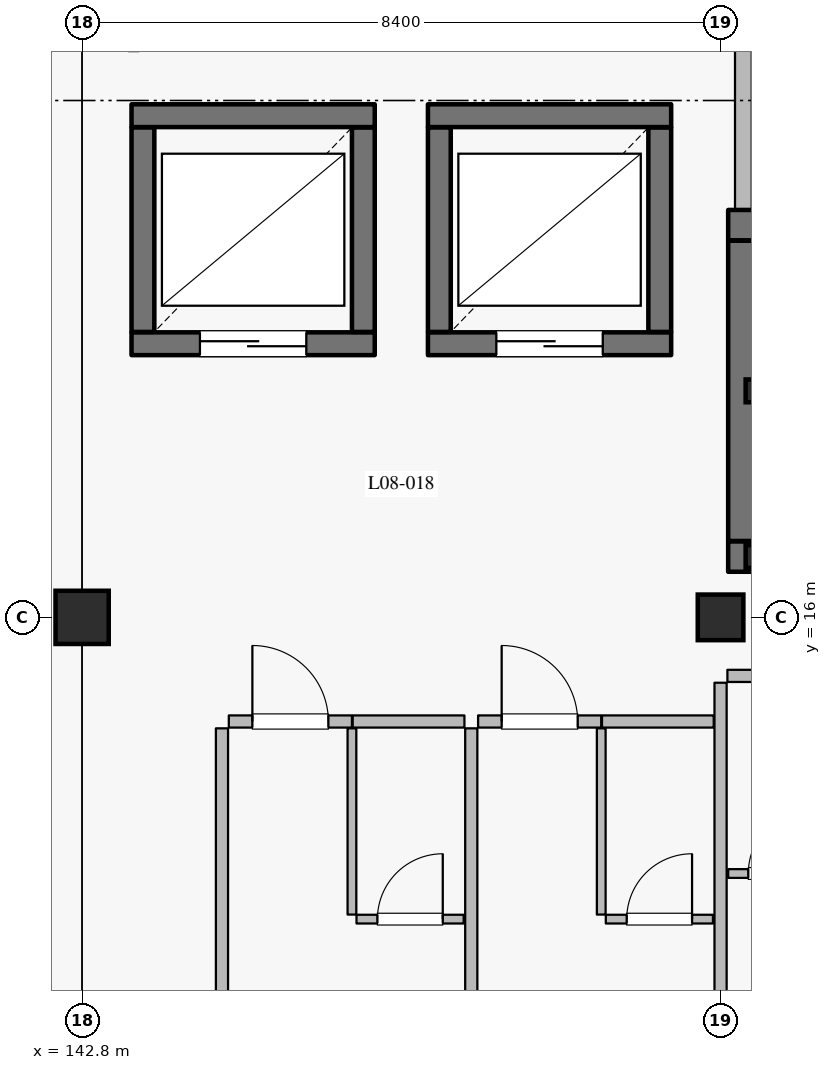
"""IFC4 building model, lengths in metres.
Left out: names, types, materials, properties, quantities, classifications, styles, units other than length and angle.
Written with IfcOpenShell. Run it as: python <this file> out.ifc"""

import sys

from ifc_helpers import new_model, si_unit, direction, frame, frame_2d, origin, origin_2d, place, context, subcontext, project, spatial, rectangle, hollow_rectangle, extrude, element, fill, save


model = new_model("IFC4")
c1 = context("Model", 3, precision=1e-05, world=origin(), true_north=direction((0.0, 1.0)))
c2 = subcontext(c1, "Body", "Model", "MODEL_VIEW")
j1 = project(units=[si_unit("LENGTHUNIT", "METRE"), si_unit("PLANEANGLEUNIT", "RADIAN")], contexts=[c1])
p1 = place(None, origin())
s1 = spatial("IfcSite", under=j1, at=p1, CompositionType="ELEMENT")
p2 = place(p1, origin())
s2 = spatial("IfcBuilding", under=s1, at=p2, CompositionType="ELEMENT")
p3 = place(p2, frame((0.0, 0.0, 36.0)))
s3 = spatial("IfcBuildingStorey", under=s2, at=p3, CompositionType="ELEMENT", Elevation=36.0)
p4 = place(p3, frame((142.8, 16.0, 0.0), z_axis=(0.0, 0.0, 1.0), x_axis=(1.0, 0.0, 0.0)))
e1 = element("IfcColumn", 1, at=p4, inside=s3, PredefinedType="COLUMN", context=c2, shape_type="SweptSolid", body=[
    extrude(rectangle(XDim=0.7, YDim=0.7, at=origin_2d()), origin(), (0.0, 0.0, 1.0), 3.6),
])
p5 = place(p3, frame((151.2, 16.0, 0.0), z_axis=(0.0, 0.0, 1.0), x_axis=(1.0, 0.0, 0.0)))
e2 = element("IfcColumn", 2, at=p5, inside=s3, PredefinedType="COLUMN", context=c2, shape_type="SweptSolid", body=[
    extrude(rectangle(XDim=0.6, YDim=0.6, at=origin_2d()), origin(), (0.0, 0.0, 1.0), 3.6),
])
p6 = place(p3, frame((143.45, 19.6, 0.0), z_axis=(0.0, 0.0, 1.0), x_axis=(1.0, 0.0, 0.0)))
e3 = element("IfcWall", 3, at=p6, inside=s3, PredefinedType="SHEAR", context=c2, shape_type="SweptSolid", body=[
    extrude(rectangle(XDim=3.2, YDim=0.3, at=frame_2d((1.6, 0.0))), origin(), (0.0, 0.0, 1.0), 3.365),
])
p7 = place(p6, frame((0.9, 0.0, 0.0)))
e4 = element("IfcOpeningElement", 4, at=p7, cuts=e3, PredefinedType="OPENING", context=c2, shape_type="SweptSolid", body=[
    extrude(rectangle(XDim=1.4, YDim=2.35, at=frame_2d((0.7, 1.175))), frame((0.0, 0.16, 0.0), z_axis=(0.0, -1.0, 0.0), x_axis=(1.0, 0.0, 0.0)), (0.0, 0.0, 1.0), 0.32),
])
p8 = place(p3, frame((146.5, 19.755, 0.0), z_axis=(0.0, 0.0, 1.0), x_axis=(0.0, 1.0, 0.0)))
e5 = element("IfcWall", 5, at=p8, inside=s3, PredefinedType="SHEAR", context=c2, shape_type="SweptSolid", body=[
    extrude(rectangle(XDim=2.69, YDim=0.3, at=frame_2d((1.345, 0.0))), origin(), (0.0, 0.0, 1.0), 3.365),
])
p9 = place(p3, frame((146.65, 22.6, 0.0), z_axis=(0.0, 0.0, 1.0), x_axis=(-1.0, 0.0, 0.0)))
e6 = element("IfcWall", 6, at=p9, inside=s3, PredefinedType="SHEAR", context=c2, shape_type="SweptSolid", body=[
    extrude(rectangle(XDim=3.2, YDim=0.3, at=frame_2d((1.6, 0.0))), origin(), (0.0, 0.0, 1.0), 3.365),
])
p10 = place(p3, frame((143.6, 22.445, 0.0), z_axis=(0.0, 0.0, 1.0), x_axis=(0.0, -1.0, 0.0)))
e7 = element("IfcWall", 7, at=p10, inside=s3, PredefinedType="SHEAR", context=c2, shape_type="SweptSolid", body=[
    extrude(rectangle(XDim=2.69, YDim=0.3, at=frame_2d((1.345, 0.0))), origin(), (0.0, 0.0, 1.0), 3.365),
])
p11 = place(p3, frame((147.35, 19.6, 0.0), z_axis=(0.0, 0.0, 1.0), x_axis=(1.0, 0.0, 0.0)))
e8 = element("IfcWall", 8, at=p11, inside=s3, PredefinedType="SHEAR", context=c2, shape_type="SweptSolid", body=[
    extrude(rectangle(XDim=3.2, YDim=0.3, at=frame_2d((1.6, 0.0))), origin(), (0.0, 0.0, 1.0), 3.365),
])
p12 = place(p11, frame((0.9, 0.0, 0.0)))
e9 = element("IfcOpeningElement", 9, at=p12, cuts=e8, PredefinedType="OPENING", context=c2, shape_type="SweptSolid", body=[
    extrude(rectangle(XDim=1.4, YDim=2.35, at=frame_2d((0.7, 1.175))), frame((0.0, 0.16, 0.0), z_axis=(0.0, -1.0, 0.0), x_axis=(1.0, 0.0, 0.0)), (0.0, 0.0, 1.0), 0.32),
])
p13 = place(p3, frame((150.4, 19.755, 0.0), z_axis=(0.0, 0.0, 1.0), x_axis=(0.0, 1.0, 0.0)))
e10 = element("IfcWall", 10, at=p13, inside=s3, PredefinedType="SHEAR", context=c2, shape_type="SweptSolid", body=[
    extrude(rectangle(XDim=2.69, YDim=0.3, at=frame_2d((1.345, 0.0))), origin(), (0.0, 0.0, 1.0), 3.365),
])
p14 = place(p3, frame((150.55, 22.6, 0.0), z_axis=(0.0, 0.0, 1.0), x_axis=(-1.0, 0.0, 0.0)))
e11 = element("IfcWall", 11, at=p14, inside=s3, PredefinedType="SHEAR", context=c2, shape_type="SweptSolid", body=[
    extrude(rectangle(XDim=3.2, YDim=0.3, at=frame_2d((1.6, 0.0))), origin(), (0.0, 0.0, 1.0), 3.365),
])
p15 = place(p3, frame((147.5, 22.445, 0.0), z_axis=(0.0, 0.0, 1.0), x_axis=(0.0, -1.0, 0.0)))
e12 = element("IfcWall", 12, at=p15, inside=s3, PredefinedType="SHEAR", context=c2, shape_type="SweptSolid", body=[
    extrude(rectangle(XDim=2.69, YDim=0.3, at=frame_2d((1.345, 0.0))), origin(), (0.0, 0.0, 1.0), 3.365),
])
p16 = place(p3, frame((151.3, 16.8, 0.0), z_axis=(0.0, 0.0, 1.0), x_axis=(1.0, 0.0, 0.0)))
e13 = element("IfcWall", 13, at=p16, inside=s3, PredefinedType="SHEAR", context=c2, shape_type="SweptSolid", body=[
    extrude(rectangle(XDim=8.2, YDim=0.4, at=frame_2d((4.1, 0.0))), origin(), (0.0, 0.0, 1.0), 3.365),
])
p17 = place(p3, frame((151.3, 21.16, 0.0), z_axis=(0.0, 0.0, 1.0), x_axis=(1.0, 0.0, 0.0)))
e14 = element("IfcWall", 14, at=p17, inside=s3, PredefinedType="SHEAR", context=c2, shape_type="SweptSolid", body=[
    extrude(rectangle(XDim=8.2, YDim=0.4, at=frame_2d((4.1, 0.0))), origin(), (0.0, 0.0, 1.0), 3.365),
])
p18 = place(p17, frame((0.43, 0.0, 0.0)))
e15 = element("IfcOpeningElement", 15, at=p18, cuts=e14, PredefinedType="OPENING", context=c2, shape_type="SweptSolid", body=[
    extrude(rectangle(XDim=1.16, YDim=2.2, at=frame_2d((0.58, 1.1))), frame((0.0, 0.21, 0.0), z_axis=(0.0, -1.0, 0.0), x_axis=(1.0, 0.0, 0.0)), (0.0, 0.0, 1.0), 0.42),
])
p19 = place(p3, frame((151.5, 17.005, 0.0), z_axis=(0.0, 0.0, 1.0), x_axis=(0.0, 1.0, 0.0)))
e16 = element("IfcWall", 16, at=p19, inside=s3, PredefinedType="SHEAR", context=c2, shape_type="SweptSolid", body=[
    extrude(rectangle(XDim=3.95, YDim=0.4, at=frame_2d((1.975, 0.0))), origin(), (0.0, 0.0, 1.0), 3.365),
])
p20 = place(p3, frame((151.5, 21.365, 0.0), z_axis=(0.0, 0.0, 1.0), x_axis=(0.0, 1.0, 0.0)))
e17 = element("IfcWall", 17, at=p20, inside=s3, PredefinedType="PARTITIONING", context=c2, shape_type="SweptSolid", body=[
    extrude(rectangle(XDim=5.82, YDim=0.22, at=frame_2d((2.91, 0.0))), origin(), (0.0, 0.0, 1.0), 3.365),
])
for number, where, z_axis, x_axis in (
    (18, (151.68, 16.8, 0.0), (0.0, 0.0, 1.0), (1.0, 0.0, 0.0)),
    (19, (151.68, 18.98, 0.0), (0.0, 0.0, 1.0), (1.0, 0.0, 0.0)),
):
    element("IfcColumn", number, at=place(p3, frame(where, z_axis=z_axis, x_axis=x_axis)), inside=s3, PredefinedType="COLUMN", context=c2, shape_type="SweptSolid", body=[
        extrude(hollow_rectangle(XDim=0.3, YDim=0.3, WallThickness=0.012, at=origin_2d()), origin(), (0.0, 0.0, 1.0), 3.42),
    ])
p21 = place(p3, frame((144.73, 14.63, 0.0), z_axis=(0.0, 0.0, 1.0), x_axis=(1.0, 0.0, 0.0)))
e20 = element("IfcWall", 20, at=p21, inside=s3, PredefinedType="PARTITIONING", context=c2, shape_type="SweptSolid", body=[
    extrude(rectangle(XDim=1.62, YDim=0.16, at=frame_2d((0.81, 0.0))), origin(), (0.0, 0.0, 1.0), 3.365),
])
p22 = place(p21, frame((0.31, 0.0, 0.0)))
e21 = element("IfcOpeningElement", 21, at=p22, cuts=e20, PredefinedType="OPENING", context=c2, shape_type="SweptSolid", body=[
    extrude(rectangle(XDim=1.0, YDim=2.25, at=frame_2d((0.5, 1.125))), frame((0.0, 0.09, 0.0), z_axis=(0.0, -1.0, 0.0), x_axis=(1.0, 0.0, 0.0)), (0.0, 0.0, 1.0), 0.18),
])
p23 = place(p3, frame((146.36, 14.63, 0.0), z_axis=(0.0, 0.0, 1.0), x_axis=(1.0, 0.0, 0.0)))
e22 = element("IfcWall", 22, at=p23, inside=s3, PredefinedType="PARTITIONING", context=c2, shape_type="SweptSolid", body=[
    extrude(rectangle(XDim=1.47, YDim=0.16, at=frame_2d((0.735, 0.0))), origin(), (0.0, 0.0, 1.0), 3.365),
])
p24 = place(p3, frame((146.35, 12.09, 0.0), z_axis=(0.0, 0.0, 1.0), x_axis=(0.0, 1.0, 0.0)))
e23 = element("IfcWall", 23, at=p24, inside=s3, PredefinedType="PARTITIONING", context=c2, shape_type="SweptSolid", body=[
    extrude(rectangle(XDim=2.45, YDim=0.115, at=frame_2d((1.225, 0.0))), origin(), (0.0, 0.0, 1.0), 3.365),
])
p25 = place(p3, frame((146.41, 12.03, 0.0), z_axis=(0.0, 0.0, 1.0), x_axis=(1.0, 0.0, 0.0)))
e24 = element("IfcWall", 24, at=p25, inside=s3, PredefinedType="PARTITIONING", context=c2, shape_type="SweptSolid", body=[
    extrude(rectangle(XDim=1.41, YDim=0.115, at=frame_2d((0.705, 0.0))), origin(), (0.0, 0.0, 1.0), 3.365),
])
p26 = place(p25, frame((0.275, 0.0, 0.0)))
e25 = element("IfcOpeningElement", 25, at=p26, cuts=e24, PredefinedType="OPENING", context=c2, shape_type="SweptSolid", body=[
    extrude(rectangle(XDim=0.86, YDim=2.12, at=frame_2d((0.43, 1.06))), frame((0.0, 0.067, 0.0), z_axis=(0.0, -1.0, 0.0), x_axis=(1.0, 0.0, 0.0)), (0.0, 0.0, 1.0), 0.135),
])
p27 = place(p3, frame((144.64, 5.22, 0.0), z_axis=(0.0, 0.0, 1.0), x_axis=(0.0, 1.0, 0.0)))
e26 = element("IfcWall", 26, at=p27, inside=s3, PredefinedType="PARTITIONING", context=c2, shape_type="SweptSolid", body=[
    extrude(rectangle(XDim=9.32, YDim=0.16, at=frame_2d((4.66, 0.0))), origin(), (0.0, 0.0, 1.0), 3.365),
])
p28 = place(p3, frame((148.01, 14.63, 0.0), z_axis=(0.0, 0.0, 1.0), x_axis=(1.0, 0.0, 0.0)))
e27 = element("IfcWall", 27, at=p28, inside=s3, PredefinedType="PARTITIONING", context=c2, shape_type="SweptSolid", body=[
    extrude(rectangle(XDim=1.62, YDim=0.16, at=frame_2d((0.81, 0.0))), origin(), (0.0, 0.0, 1.0), 3.365),
])
p29 = place(p28, frame((0.31, 0.0, 0.0)))
e28 = element("IfcOpeningElement", 28, at=p29, cuts=e27, PredefinedType="OPENING", context=c2, shape_type="SweptSolid", body=[
    extrude(rectangle(XDim=1.0, YDim=2.25, at=frame_2d((0.5, 1.125))), frame((0.0, 0.09, 0.0), z_axis=(0.0, -1.0, 0.0), x_axis=(1.0, 0.0, 0.0)), (0.0, 0.0, 1.0), 0.18),
])
p30 = place(p3, frame((149.64, 14.63, 0.0), z_axis=(0.0, 0.0, 1.0), x_axis=(1.0, 0.0, 0.0)))
e29 = element("IfcWall", 29, at=p30, inside=s3, PredefinedType="PARTITIONING", context=c2, shape_type="SweptSolid", body=[
    extrude(rectangle(XDim=1.47, YDim=0.16, at=frame_2d((0.735, 0.0))), origin(), (0.0, 0.0, 1.0), 3.365),
])
p31 = place(p3, frame((149.63, 12.09, 0.0), z_axis=(0.0, 0.0, 1.0), x_axis=(0.0, 1.0, 0.0)))
e30 = element("IfcWall", 30, at=p31, inside=s3, PredefinedType="PARTITIONING", context=c2, shape_type="SweptSolid", body=[
    extrude(rectangle(XDim=2.45, YDim=0.115, at=frame_2d((1.225, 0.0))), origin(), (0.0, 0.0, 1.0), 3.365),
])
p32 = place(p3, frame((149.69, 12.03, 0.0), z_axis=(0.0, 0.0, 1.0), x_axis=(1.0, 0.0, 0.0)))
e31 = element("IfcWall", 31, at=p32, inside=s3, PredefinedType="PARTITIONING", context=c2, shape_type="SweptSolid", body=[
    extrude(rectangle(XDim=1.41, YDim=0.115, at=frame_2d((0.705, 0.0))), origin(), (0.0, 0.0, 1.0), 3.365),
])
p33 = place(p32, frame((0.275, 0.0, 0.0)))
e32 = element("IfcOpeningElement", 32, at=p33, cuts=e31, PredefinedType="OPENING", context=c2, shape_type="SweptSolid", body=[
    extrude(rectangle(XDim=0.86, YDim=2.12, at=frame_2d((0.43, 1.06))), frame((0.0, 0.067, 0.0), z_axis=(0.0, -1.0, 0.0), x_axis=(1.0, 0.0, 0.0)), (0.0, 0.0, 1.0), 0.135),
])
p34 = place(p3, frame((147.92, 8.34, 0.0), z_axis=(0.0, 0.0, 1.0), x_axis=(0.0, 1.0, 0.0)))
e33 = element("IfcWall", 33, at=p34, inside=s3, PredefinedType="PARTITIONING", context=c2, shape_type="SweptSolid", body=[
    extrude(rectangle(XDim=6.2, YDim=0.16, at=frame_2d((3.1, 0.0))), origin(), (0.0, 0.0, 1.0), 3.365),
])
p35 = place(p3, frame((151.29, 15.23, 0.0), z_axis=(0.0, 0.0, 1.0), x_axis=(1.0, 0.0, 0.0)))
e34 = element("IfcWall", 34, at=p35, inside=s3, PredefinedType="PARTITIONING", context=c2, shape_type="SweptSolid", body=[
    extrude(rectangle(XDim=1.45, YDim=0.16, at=frame_2d((0.725, 0.0))), origin(), (0.0, 0.0, 1.0), 3.365),
])
p36 = place(p3, frame((151.3, 12.63, 0.0), z_axis=(0.0, 0.0, 1.0), x_axis=(1.0, 0.0, 0.0)))
e35 = element("IfcWall", 35, at=p36, inside=s3, PredefinedType="PARTITIONING", context=c2, shape_type="SweptSolid", body=[
    extrude(rectangle(XDim=1.39, YDim=0.115, at=frame_2d((0.695, 0.0))), origin(), (0.0, 0.0, 1.0), 3.365),
])
p37 = place(p36, frame((0.265, 0.0, 0.0)))
e36 = element("IfcOpeningElement", 36, at=p37, cuts=e35, PredefinedType="OPENING", context=c2, shape_type="SweptSolid", body=[
    extrude(rectangle(XDim=0.86, YDim=2.12, at=frame_2d((0.43, 1.06))), frame((0.0, 0.067, 0.0), z_axis=(0.0, -1.0, 0.0), x_axis=(1.0, 0.0, 0.0)), (0.0, 0.0, 1.0), 0.135),
])
p38 = place(p3, frame((151.2, 8.34, 0.0), z_axis=(0.0, 0.0, 1.0), x_axis=(0.0, 1.0, 0.0)))
e37 = element("IfcWall", 37, at=p38, inside=s3, PredefinedType="PARTITIONING", context=c2, shape_type="SweptSolid", body=[
    extrude(rectangle(XDim=6.8, YDim=0.16, at=frame_2d((3.4, 0.0))), origin(), (0.0, 0.0, 1.0), 2.74),
])
p39 = place(p7, origin())
e38 = element("IfcDoor", 38, at=p39, inside=s3, OperationType="DOUBLE_DOOR_SLIDING", PredefinedType="DOOR", context=c2, shape_type="SweptSolid", body=[
    extrude(rectangle(XDim=1.4, YDim=2.35, at=frame_2d((0.7, 1.175))), frame((0.0, 0.025, 0.0), z_axis=(0.0, -1.0, 0.0), x_axis=(1.0, 0.0, 0.0)), (0.0, 0.0, 1.0), 0.05),
])
fill(e4, e38)
p40 = place(p12, origin())
e39 = element("IfcDoor", 39, at=p40, inside=s3, OperationType="DOUBLE_DOOR_SLIDING", PredefinedType="DOOR", context=c2, shape_type="SweptSolid", body=[
    extrude(rectangle(XDim=1.4, YDim=2.35, at=frame_2d((0.7, 1.175))), frame((0.0, 0.025, 0.0), z_axis=(0.0, -1.0, 0.0), x_axis=(1.0, 0.0, 0.0)), (0.0, 0.0, 1.0), 0.05),
])
fill(e9, e39)
p41 = place(p22, origin())
e40 = element("IfcDoor", 40, at=p41, inside=s3, OperationType="SINGLE_SWING_LEFT", PredefinedType="DOOR", context=c2, shape_type="SweptSolid", body=[
    extrude(rectangle(XDim=1.0, YDim=2.25, at=frame_2d((0.5, 1.125))), frame((0.0, 0.025, 0.0), z_axis=(0.0, -1.0, 0.0), x_axis=(1.0, 0.0, 0.0)), (0.0, 0.0, 1.0), 0.05),
])
fill(e21, e40)
p42 = place(p26, origin())
e41 = element("IfcDoor", 41, at=p42, inside=s3, OperationType="SINGLE_SWING_RIGHT", PredefinedType="DOOR", context=c2, shape_type="SweptSolid", body=[
    extrude(rectangle(XDim=0.86, YDim=2.12, at=frame_2d((0.43, 1.06))), frame((0.0, 0.025, 0.0), z_axis=(0.0, -1.0, 0.0), x_axis=(1.0, 0.0, 0.0)), (0.0, 0.0, 1.0), 0.05),
])
fill(e25, e41)
p43 = place(p29, origin())
e42 = element("IfcDoor", 42, at=p43, inside=s3, OperationType="SINGLE_SWING_LEFT", PredefinedType="DOOR", context=c2, shape_type="SweptSolid", body=[
    extrude(rectangle(XDim=1.0, YDim=2.25, at=frame_2d((0.5, 1.125))), frame((0.0, 0.025, 0.0), z_axis=(0.0, -1.0, 0.0), x_axis=(1.0, 0.0, 0.0)), (0.0, 0.0, 1.0), 0.05),
])
fill(e28, e42)
p44 = place(p33, origin())
e43 = element("IfcDoor", 43, at=p44, inside=s3, OperationType="SINGLE_SWING_RIGHT", PredefinedType="DOOR", context=c2, shape_type="SweptSolid", body=[
    extrude(rectangle(XDim=0.86, YDim=2.12, at=frame_2d((0.43, 1.06))), frame((0.0, 0.025, 0.0), z_axis=(0.0, -1.0, 0.0), x_axis=(1.0, 0.0, 0.0)), (0.0, 0.0, 1.0), 0.05),
])
fill(e32, e43)
p45 = place(p37, origin())
e44 = element("IfcDoor", 44, at=p45, inside=s3, OperationType="SINGLE_SWING_RIGHT", PredefinedType="DOOR", context=c2, shape_type="SweptSolid", body=[
    extrude(rectangle(XDim=0.86, YDim=2.12, at=frame_2d((0.43, 1.06))), frame((0.0, 0.025, 0.0), z_axis=(0.0, -1.0, 0.0), x_axis=(1.0, 0.0, 0.0)), (0.0, 0.0, 1.0), 0.05),
])
fill(e36, e44)
save(model, sys.argv[1])
